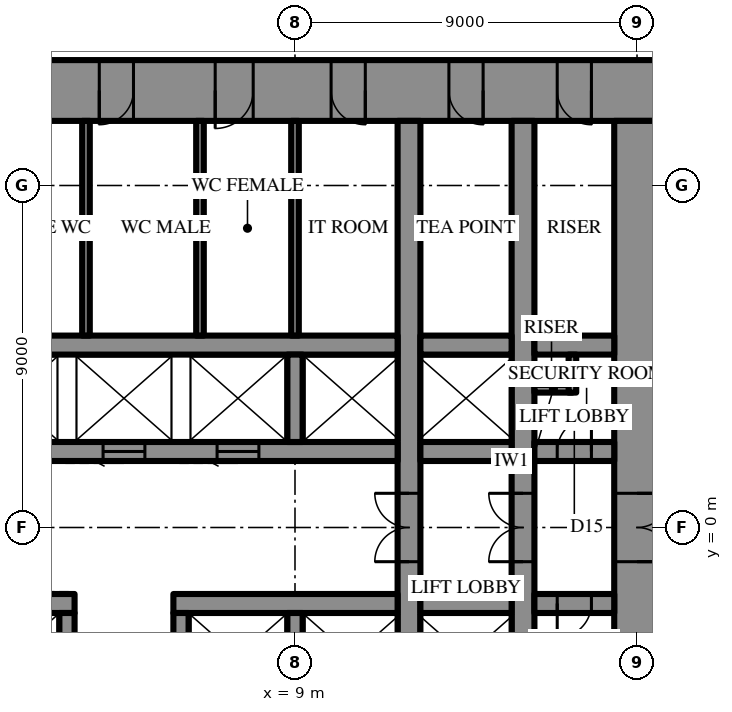
"""IFC4 building model, lengths in metres.
Left out: names, types, materials, properties, quantities, classifications, styles, units other than length and angle.
Written with IfcOpenShell. Run it as: python <this file> out.ifc"""

import sys

from ifc_helpers import new_model, si_unit, direction, frame, frame_2d, origin, place, context, subcontext, project, spatial, rectangle, extrude, element, fill, save


model = new_model("IFC4")
c1 = context("Model", 3, precision=1e-05, world=origin(), true_north=direction((0.0, 1.0)))
c2 = subcontext(c1, "Body", "Model", "MODEL_VIEW")
j1 = project(units=[si_unit("LENGTHUNIT", "METRE"), si_unit("PLANEANGLEUNIT", "RADIAN")], contexts=[c1])
p1 = place(None, origin())
s1 = spatial("IfcSite", under=j1, at=p1, CompositionType="ELEMENT")
p2 = place(p1, origin())
s2 = spatial("IfcBuilding", under=s1, at=p2, CompositionType="ELEMENT")
p3 = place(p2, frame((0.0, 0.0, 195.1)))
s3 = spatial("IfcBuildingStorey", under=s2, at=p3, CompositionType="ELEMENT", Elevation=195.1)
p4 = place(p3, frame((-18.6, 11.5, 0.0), z_axis=(0.0, 0.0, 1.0), x_axis=(1.0, 0.0, 0.0)))
e1 = element("IfcWall", 1, at=p4, inside=s3, PredefinedType="SHEAR", context=c2, shape_type="SweptSolid", body=[
    extrude(rectangle(XDim=37.2, YDim=1.6, at=frame_2d((18.6, 0.0))), origin(), (0.0, 0.0, 1.0), 4.2),
])
p5 = place(p4, frame((19.45, 0.0, 0.0)))
e2 = element("IfcOpeningElement", 2, at=p5, cuts=e1, PredefinedType="OPENING", context=c2, shape_type="SweptSolid", body=[
    extrude(rectangle(XDim=0.9, YDim=2.2, at=frame_2d((0.45, 1.1))), frame((0.0, 0.81, 0.0), z_axis=(0.0, -1.0, 0.0), x_axis=(1.0, 0.0, 0.0)), (0.0, 0.0, 1.0), 1.62),
])
p6 = place(p4, frame((22.45, 0.0, 0.0)))
e3 = element("IfcOpeningElement", 3, at=p6, cuts=e1, PredefinedType="OPENING", context=c2, shape_type="SweptSolid", body=[
    extrude(rectangle(XDim=0.9, YDim=2.2, at=frame_2d((0.45, 1.1))), frame((0.0, 0.81, 0.0), z_axis=(0.0, -1.0, 0.0), x_axis=(1.0, 0.0, 0.0)), (0.0, 0.0, 1.0), 1.62),
])
p7 = place(p4, frame((25.5, 0.0, 0.0)))
e4 = element("IfcOpeningElement", 4, at=p7, cuts=e1, PredefinedType="OPENING", context=c2, shape_type="SweptSolid", body=[
    extrude(rectangle(XDim=1.0, YDim=2.2, at=frame_2d((0.5, 1.1))), frame((0.0, 0.81, 0.0), z_axis=(0.0, -1.0, 0.0), x_axis=(1.0, 0.0, 0.0)), (0.0, 0.0, 1.0), 1.62),
])
p8 = place(p4, frame((1.8, 0.0, 0.0)))
e5 = element("IfcOpeningElement", 5, at=p8, cuts=e1, PredefinedType="OPENING", context=c2, shape_type="SweptSolid", body=[
    extrude(rectangle(XDim=0.9, YDim=2.2, at=frame_2d((0.45, 1.1))), frame((0.0, 0.81, 0.0), z_axis=(0.0, -1.0, 0.0), x_axis=(1.0, 0.0, 0.0)), (0.0, 0.0, 1.0), 1.62),
])
p9 = place(p4, frame((4.65, 0.0, 0.0)))
e6 = element("IfcOpeningElement", 6, at=p9, cuts=e1, PredefinedType="OPENING", context=c2, shape_type="SweptSolid", body=[
    extrude(rectangle(XDim=0.9, YDim=2.2, at=frame_2d((0.45, 1.1))), frame((0.0, 0.81, 0.0), z_axis=(0.0, -1.0, 0.0), x_axis=(1.0, 0.0, 0.0)), (0.0, 0.0, 1.0), 1.62),
])
p10 = place(p4, frame((7.75, 0.0, 0.0)))
e7 = element("IfcOpeningElement", 7, at=p10, cuts=e1, PredefinedType="OPENING", context=c2, shape_type="SweptSolid", body=[
    extrude(rectangle(XDim=0.9, YDim=2.2, at=frame_2d((0.45, 1.1))), frame((0.0, 0.81, 0.0), z_axis=(0.0, -1.0, 0.0), x_axis=(1.0, 0.0, 0.0)), (0.0, 0.0, 1.0), 1.62),
])
p11 = place(p4, frame((28.55, 0.0, 0.0)))
e8 = element("IfcOpeningElement", 8, at=p11, cuts=e1, PredefinedType="OPENING", context=c2, shape_type="SweptSolid", body=[
    extrude(rectangle(XDim=0.9, YDim=2.2, at=frame_2d((0.45, 1.1))), frame((0.0, 0.81, 0.0), z_axis=(0.0, -1.0, 0.0), x_axis=(1.0, 0.0, 0.0)), (0.0, 0.0, 1.0), 1.62),
])
p12 = place(p4, frame((31.65, 0.0, 0.0)))
e9 = element("IfcOpeningElement", 9, at=p12, cuts=e1, PredefinedType="OPENING", context=c2, shape_type="SweptSolid", body=[
    extrude(rectangle(XDim=0.9, YDim=2.2, at=frame_2d((0.45, 1.1))), frame((0.0, 0.81, 0.0), z_axis=(0.0, -1.0, 0.0), x_axis=(1.0, 0.0, 0.0)), (0.0, 0.0, 1.0), 1.62),
])
p13 = place(p4, frame((34.5, 0.0, 0.0)))
e10 = element("IfcOpeningElement", 10, at=p13, cuts=e1, PredefinedType="OPENING", context=c2, shape_type="SweptSolid", body=[
    extrude(rectangle(XDim=0.9, YDim=2.2, at=frame_2d((0.45, 1.1))), frame((0.0, 0.81, 0.0), z_axis=(0.0, -1.0, 0.0), x_axis=(1.0, 0.0, 0.0)), (0.0, 0.0, 1.0), 1.62),
])
p14 = place(p3, frame((18.0, -10.7, 0.0), z_axis=(0.0, 0.0, 1.0), x_axis=(0.0, 1.0, 0.0)))
e11 = element("IfcWall", 11, at=p14, inside=s3, PredefinedType="SHEAR", context=c2, shape_type="SweptSolid", body=[
    extrude(rectangle(XDim=21.4, YDim=1.2, at=frame_2d((10.7, 0.0))), origin(), (0.0, 0.0, 1.0), 4.2),
])
p15 = place(p14, frame((9.8, 0.0, 0.0)))
e12 = element("IfcOpeningElement", 12, at=p15, cuts=e11, PredefinedType="OPENING", context=c2, shape_type="SweptSolid", body=[
    extrude(rectangle(XDim=1.8, YDim=2.4, at=frame_2d((0.9, 1.2))), frame((0.0, 0.61, 0.0), z_axis=(0.0, -1.0, 0.0), x_axis=(1.0, 0.0, 0.0)), (0.0, 0.0, 1.0), 1.22),
])
p16 = place(p3, frame((12.0, -10.7, 0.0), z_axis=(0.0, 0.0, 1.0), x_axis=(0.0, 1.0, 0.0)))
e13 = element("IfcWall", 13, at=p16, inside=s3, PredefinedType="SHEAR", context=c2, shape_type="SweptSolid", body=[
    extrude(rectangle(XDim=21.4, YDim=0.6, at=frame_2d((10.7, 0.0))), origin(), (0.0, 0.0, 1.0), 4.2),
])
p17 = place(p16, frame((9.8, 0.0, 0.0)))
e14 = element("IfcOpeningElement", 14, at=p17, cuts=e13, PredefinedType="OPENING", context=c2, shape_type="SweptSolid", body=[
    extrude(rectangle(XDim=1.8, YDim=2.4, at=frame_2d((0.9, 1.2))), frame((0.0, 0.31, 0.0), z_axis=(0.0, -1.0, 0.0), x_axis=(1.0, 0.0, 0.0)), (0.0, 0.0, 1.0), 0.62),
])
p18 = place(p3, frame((15.0, -10.7, 0.0), z_axis=(0.0, 0.0, 1.0), x_axis=(0.0, 1.0, 0.0)))
e15 = element("IfcWall", 15, at=p18, inside=s3, PredefinedType="SHEAR", context=c2, shape_type="SweptSolid", body=[
    extrude(rectangle(XDim=21.4, YDim=0.6, at=frame_2d((10.7, 0.0))), origin(), (0.0, 0.0, 1.0), 4.2),
])
p19 = place(p18, frame((9.8, 0.0, 0.0)))
e16 = element("IfcOpeningElement", 16, at=p19, cuts=e15, PredefinedType="OPENING", context=c2, shape_type="SweptSolid", body=[
    extrude(rectangle(XDim=1.8, YDim=2.4, at=frame_2d((0.9, 1.2))), frame((0.0, 0.31, 0.0), z_axis=(0.0, -1.0, 0.0), x_axis=(1.0, 0.0, 0.0)), (0.0, 0.0, 1.0), 0.62),
])
p20 = place(p3, frame((-3.2, 2.0, 0.0), z_axis=(0.0, 0.0, 1.0), x_axis=(1.0, 0.0, 0.0)))
e17 = element("IfcWall", 17, at=p20, inside=s3, PredefinedType="SHEAR", context=c2, shape_type="SweptSolid", body=[
    extrude(rectangle(XDim=14.9, YDim=0.5, at=frame_2d((7.45, 0.0))), origin(), (0.0, 0.0, 1.0), 4.2),
])
p21 = place(p20, frame((1.15, 0.0, 0.0)))
e18 = element("IfcOpeningElement", 18, at=p21, cuts=e17, PredefinedType="OPENING", context=c2, shape_type="SweptSolid", body=[
    extrude(rectangle(XDim=1.1, YDim=2.2, at=frame_2d((0.55, 1.1))), frame((0.0, 0.26, 0.0), z_axis=(0.0, -1.0, 0.0), x_axis=(1.0, 0.0, 0.0)), (0.0, 0.0, 1.0), 0.52),
])
p22 = place(p20, frame((4.15, 0.0, 0.0)))
e19 = element("IfcOpeningElement", 19, at=p22, cuts=e17, PredefinedType="OPENING", context=c2, shape_type="SweptSolid", body=[
    extrude(rectangle(XDim=1.1, YDim=2.2, at=frame_2d((0.55, 1.1))), frame((0.0, 0.26, 0.0), z_axis=(0.0, -1.0, 0.0), x_axis=(1.0, 0.0, 0.0)), (0.0, 0.0, 1.0), 0.52),
])
p23 = place(p20, frame((7.15, 0.0, 0.0)))
e20 = element("IfcOpeningElement", 20, at=p23, cuts=e17, PredefinedType="OPENING", context=c2, shape_type="SweptSolid", body=[
    extrude(rectangle(XDim=1.1, YDim=2.2, at=frame_2d((0.55, 1.1))), frame((0.0, 0.26, 0.0), z_axis=(0.0, -1.0, 0.0), x_axis=(1.0, 0.0, 0.0)), (0.0, 0.0, 1.0), 0.52),
])
p24 = place(p20, frame((10.15, 0.0, 0.0)))
e21 = element("IfcOpeningElement", 21, at=p24, cuts=e17, PredefinedType="OPENING", context=c2, shape_type="SweptSolid", body=[
    extrude(rectangle(XDim=1.1, YDim=2.2, at=frame_2d((0.55, 1.1))), frame((0.0, 0.26, 0.0), z_axis=(0.0, -1.0, 0.0), x_axis=(1.0, 0.0, 0.0)), (0.0, 0.0, 1.0), 0.52),
])
p25 = place(p3, frame((12.3, 2.0, 0.0), z_axis=(0.0, 0.0, 1.0), x_axis=(1.0, 0.0, 0.0)))
e22 = element("IfcWall", 22, at=p25, inside=s3, PredefinedType="SHEAR", context=c2, shape_type="SweptSolid", body=[
    extrude(rectangle(XDim=2.4, YDim=0.5, at=frame_2d((1.2, 0.0))), origin(), (0.0, 0.0, 1.0), 4.2),
])
p26 = place(p3, frame((15.3, 2.0, 0.0), z_axis=(0.0, 0.0, 1.0), x_axis=(1.0, 0.0, 0.0)))
e23 = element("IfcWall", 23, at=p26, inside=s3, PredefinedType="SHEAR", context=c2, shape_type="SweptSolid", body=[
    extrude(rectangle(XDim=2.1, YDim=0.5, at=frame_2d((1.05, 0.0))), origin(), (0.0, 0.0, 1.0), 4.2),
])
p27 = place(p26, frame((0.6, 0.0, 0.0)))
e24 = element("IfcOpeningElement", 24, at=p27, cuts=e23, PredefinedType="OPENING", context=c2, shape_type="SweptSolid", body=[
    extrude(rectangle(XDim=0.9, YDim=2.2, at=frame_2d((0.45, 1.1))), frame((0.0, 0.26, 0.0), z_axis=(0.0, -1.0, 0.0), x_axis=(1.0, 0.0, 0.0)), (0.0, 0.0, 1.0), 0.52),
])
p28 = place(p3, frame((-11.7, 4.8, 0.0), z_axis=(0.0, 0.0, 1.0), x_axis=(1.0, 0.0, 0.0)))
e25 = element("IfcWall", 25, at=p28, inside=s3, PredefinedType="SHEAR", context=c2, shape_type="SweptSolid", body=[
    extrude(rectangle(XDim=23.4, YDim=0.5, at=frame_2d((11.7, 0.0))), origin(), (0.0, 0.0, 1.0), 4.2),
])
p29 = place(p28, frame((6.6, 0.0, 0.0)))
e26 = element("IfcOpeningElement", 26, at=p29, cuts=e25, PredefinedType="OPENING", context=c2, shape_type="SweptSolid", body=[
    extrude(rectangle(XDim=1.2, YDim=2.2, at=frame_2d((0.6, 1.1))), frame((0.0, 0.26, 0.0), z_axis=(0.0, -1.0, 0.0), x_axis=(1.0, 0.0, 0.0)), (0.0, 0.0, 1.0), 0.52),
])
p30 = place(p28, frame((3.6, 0.0, 0.0)))
e27 = element("IfcOpeningElement", 27, at=p30, cuts=e25, PredefinedType="OPENING", context=c2, shape_type="SweptSolid", body=[
    extrude(rectangle(XDim=1.2, YDim=2.2, at=frame_2d((0.6, 1.1))), frame((0.0, 0.26, 0.0), z_axis=(0.0, -1.0, 0.0), x_axis=(1.0, 0.0, 0.0)), (0.0, 0.0, 1.0), 0.52),
])
p31 = place(p3, frame((12.3, 4.8, 0.0), z_axis=(0.0, 0.0, 1.0), x_axis=(1.0, 0.0, 0.0)))
e28 = element("IfcWall", 28, at=p31, inside=s3, PredefinedType="SHEAR", context=c2, shape_type="SweptSolid", body=[
    extrude(rectangle(XDim=2.4, YDim=0.5, at=frame_2d((1.2, 0.0))), origin(), (0.0, 0.0, 1.0), 4.2),
])
p32 = place(p3, frame((15.3, 4.8, 0.0), z_axis=(0.0, 0.0, 1.0), x_axis=(1.0, 0.0, 0.0)))
e29 = element("IfcWall", 29, at=p32, inside=s3, PredefinedType="SHEAR", context=c2, shape_type="SweptSolid", body=[
    extrude(rectangle(XDim=2.1, YDim=0.5, at=frame_2d((1.05, 0.0))), origin(), (0.0, 0.0, 1.0), 4.2),
])
p33 = place(p3, frame((9.0, 2.25, 0.0), z_axis=(0.0, 0.0, 1.0), x_axis=(0.0, 1.0, 0.0)))
e30 = element("IfcWall", 30, at=p33, inside=s3, PredefinedType="SHEAR", context=c2, shape_type="SweptSolid", body=[
    extrude(rectangle(XDim=2.3, YDim=0.4, at=frame_2d((1.15, 0.0))), origin(), (0.0, 0.0, 1.0), 4.2),
])
p34 = place(p3, frame((17.4, -2.0, 0.0), z_axis=(0.0, 0.0, 1.0), x_axis=(-1.0, 0.0, 0.0)))
e31 = element("IfcWall", 31, at=p34, inside=s3, PredefinedType="SHEAR", context=c2, shape_type="SweptSolid", body=[
    extrude(rectangle(XDim=2.1, YDim=0.5, at=frame_2d((1.05, 0.0))), origin(), (0.0, 0.0, 1.0), 4.2),
])
p35 = place(p34, frame((0.6, 0.0, 0.0)))
e32 = element("IfcOpeningElement", 32, at=p35, cuts=e31, PredefinedType="OPENING", context=c2, shape_type="SweptSolid", body=[
    extrude(rectangle(XDim=0.9, YDim=2.2, at=frame_2d((0.45, 1.1))), frame((0.0, 0.26, 0.0), z_axis=(0.0, -1.0, 0.0), x_axis=(1.0, 0.0, 0.0)), (0.0, 0.0, 1.0), 0.52),
])
p36 = place(p3, frame((14.7, -2.0, 0.0), z_axis=(0.0, 0.0, 1.0), x_axis=(-1.0, 0.0, 0.0)))
e33 = element("IfcWall", 33, at=p36, inside=s3, PredefinedType="SHEAR", context=c2, shape_type="SweptSolid", body=[
    extrude(rectangle(XDim=2.4, YDim=0.5, at=frame_2d((1.2, 0.0))), origin(), (0.0, 0.0, 1.0), 4.2),
])
p37 = place(p3, frame((11.7, -2.0, 0.0), z_axis=(0.0, 0.0, 1.0), x_axis=(-1.0, 0.0, 0.0)))
e34 = element("IfcWall", 34, at=p37, inside=s3, PredefinedType="SHEAR", context=c2, shape_type="SweptSolid", body=[
    extrude(rectangle(XDim=5.9, YDim=0.5, at=frame_2d((2.95, 0.0))), origin(), (0.0, 0.0, 1.0), 4.2),
])
p38 = place(p3, frame((3.2, -2.0, 0.0), z_axis=(0.0, 0.0, 1.0), x_axis=(-1.0, 0.0, 0.0)))
e35 = element("IfcWall", 35, at=p38, inside=s3, PredefinedType="SHEAR", context=c2, shape_type="SweptSolid", body=[
    extrude(rectangle(XDim=14.9, YDim=0.5, at=frame_2d((7.45, 0.0))), origin(), (0.0, 0.0, 1.0), 4.2),
])
p39 = place(p38, frame((1.15, 0.0, 0.0)))
e36 = element("IfcOpeningElement", 36, at=p39, cuts=e35, PredefinedType="OPENING", context=c2, shape_type="SweptSolid", body=[
    extrude(rectangle(XDim=1.1, YDim=2.2, at=frame_2d((0.55, 1.1))), frame((0.0, 0.26, 0.0), z_axis=(0.0, -1.0, 0.0), x_axis=(1.0, 0.0, 0.0)), (0.0, 0.0, 1.0), 0.52),
])
p40 = place(p38, frame((4.15, 0.0, 0.0)))
e37 = element("IfcOpeningElement", 37, at=p40, cuts=e35, PredefinedType="OPENING", context=c2, shape_type="SweptSolid", body=[
    extrude(rectangle(XDim=1.1, YDim=2.2, at=frame_2d((0.55, 1.1))), frame((0.0, 0.26, 0.0), z_axis=(0.0, -1.0, 0.0), x_axis=(1.0, 0.0, 0.0)), (0.0, 0.0, 1.0), 0.52),
])
p41 = place(p38, frame((7.15, 0.0, 0.0)))
e38 = element("IfcOpeningElement", 38, at=p41, cuts=e35, PredefinedType="OPENING", context=c2, shape_type="SweptSolid", body=[
    extrude(rectangle(XDim=1.1, YDim=2.2, at=frame_2d((0.55, 1.1))), frame((0.0, 0.26, 0.0), z_axis=(0.0, -1.0, 0.0), x_axis=(1.0, 0.0, 0.0)), (0.0, 0.0, 1.0), 0.52),
])
p42 = place(p38, frame((10.15, 0.0, 0.0)))
e39 = element("IfcOpeningElement", 39, at=p42, cuts=e35, PredefinedType="OPENING", context=c2, shape_type="SweptSolid", body=[
    extrude(rectangle(XDim=1.1, YDim=2.2, at=frame_2d((0.55, 1.1))), frame((0.0, 0.26, 0.0), z_axis=(0.0, -1.0, 0.0), x_axis=(1.0, 0.0, 0.0)), (0.0, 0.0, 1.0), 0.52),
])
for number, where, z_axis, x_axis in (
    (40, (9.0, -2.25, 0.0), (0.0, 0.0, 1.0), (0.0, -1.0, 0.0)),
    (41, (6.0, -2.25, 0.0), (0.0, 0.0, 1.0), (0.0, -1.0, 0.0)),
    (42, (3.0, -2.25, 0.0), (0.0, 0.0, 1.0), (0.0, -1.0, 0.0)),
):
    element("IfcWall", number, at=place(p3, frame(where, z_axis=z_axis, x_axis=x_axis)), inside=s3, PredefinedType="SHEAR", context=c2, shape_type="SweptSolid", body=[
        extrude(rectangle(XDim=2.3, YDim=0.4, at=frame_2d((1.15, 0.0))), origin(), (0.0, 0.0, 1.0), 4.2),
    ])
for number, where, z_axis, x_axis in (
    (43, (9.0, 5.05, 0.0), (0.0, 0.0, 1.0), (0.0, 1.0, 0.0)),
    (44, (3.5, 5.05, 0.0), (0.0, 0.0, 1.0), (0.0, 1.0, 0.0)),
    (45, (6.5, 5.05, 0.0), (0.0, 0.0, 1.0), (0.0, 1.0, 0.0)),
):
    element("IfcWall", number, at=place(p3, frame(where, z_axis=z_axis, x_axis=x_axis)), inside=s3, PredefinedType="PARTITIONING", context=c2, shape_type="SweptSolid", body=[
        extrude(rectangle(XDim=5.65, YDim=0.2, at=frame_2d((2.825, 0.0))), origin(), (0.0, 0.0, 1.0), 4.0),
    ])
for number, where, z_axis, x_axis in (
    (46, (15.3, 3.65, 0.0), (0.0, 0.0, 1.0), (1.0, 0.0, 0.0)),
    (47, (16.3, 3.55, 0.0), (0.0, 0.0, 1.0), (0.0, 1.0, 0.0)),
):
    element("IfcWall", number, at=place(p3, frame(where, z_axis=z_axis, x_axis=x_axis)), inside=s3, PredefinedType="PARTITIONING", context=c2, shape_type="SweptSolid", body=[
        extrude(rectangle(XDim=1.0, YDim=0.2, at=frame_2d((0.5, 0.0))), origin(), (0.0, 0.0, 1.0), 4.0),
    ])
p43 = place(p3, frame((28.436, 4.747, 0.0), z_axis=(0.0, 0.0, 1.0), x_axis=(-0.499995666571, 0.866027905677, 0.0)))
e48 = element("IfcWall", 48, at=p43, inside=s3, PredefinedType="PARTITIONING", context=c2, shape_type="SweptSolid", body=[
    extrude(rectangle(XDim=20.215, YDim=0.2, at=frame_2d((10.107, 0.0))), origin(), (0.0, 0.0, 1.0), 4.0),
])
p44 = place(p43, frame((2.102, 0.0, 0.0)))
e49 = element("IfcOpeningElement", 49, at=p44, cuts=e48, PredefinedType="OPENING", context=c2, shape_type="SweptSolid", body=[
    extrude(rectangle(XDim=1.0, YDim=2.2, at=frame_2d((0.5, 1.1))), frame((0.0, 0.11, 0.0), z_axis=(0.0, -1.0, 0.0), x_axis=(1.0, 0.0, 0.0)), (0.0, 0.0, 1.0), 0.22),
])
p45 = place(p43, frame((7.105, 0.0, 0.0)))
e50 = element("IfcOpeningElement", 50, at=p45, cuts=e48, PredefinedType="OPENING", context=c2, shape_type="SweptSolid", body=[
    extrude(rectangle(XDim=1.0, YDim=2.2, at=frame_2d((0.5, 1.1))), frame((0.0, 0.11, 0.0), z_axis=(0.0, -1.0, 0.0), x_axis=(1.0, 0.0, 0.0)), (0.0, 0.0, 1.0), 0.22),
])
p46 = place(p43, frame((12.109, 0.0, 0.0)))
e51 = element("IfcOpeningElement", 51, at=p46, cuts=e48, PredefinedType="OPENING", context=c2, shape_type="SweptSolid", body=[
    extrude(rectangle(XDim=1.0, YDim=2.2, at=frame_2d((0.5, 1.1))), frame((0.0, 0.11, 0.0), z_axis=(0.0, -1.0, 0.0), x_axis=(1.0, 0.0, 0.0)), (0.0, 0.0, 1.0), 0.22),
])
p47 = place(p43, frame((17.113, 0.0, 0.0)))
e52 = element("IfcOpeningElement", 52, at=p47, cuts=e48, PredefinedType="OPENING", context=c2, shape_type="SweptSolid", body=[
    extrude(rectangle(XDim=1.0, YDim=2.2, at=frame_2d((0.5, 1.1))), frame((0.0, 0.11, 0.0), z_axis=(0.0, -1.0, 0.0), x_axis=(1.0, 0.0, 0.0)), (0.0, 0.0, 1.0), 0.22),
])
p48 = place(p15, frame((1.8, 0.0, 0.0), z_axis=(0.0, 0.0, 1.0), x_axis=(-1.0, 0.0, 0.0)))
e53 = element("IfcDoor", 53, at=p48, inside=s3, OperationType="DOUBLE_DOOR_SINGLE_SWING", PredefinedType="DOOR", context=c2, shape_type="SweptSolid", body=[
    extrude(rectangle(XDim=1.8, YDim=2.4, at=frame_2d((0.9, 1.2))), frame((0.0, 0.025, 0.0), z_axis=(0.0, -1.0, 0.0), x_axis=(1.0, 0.0, 0.0)), (0.0, 0.0, 1.0), 0.05),
])
fill(e12, e53)
p49 = place(p6, frame((0.9, 0.0, 0.0), z_axis=(0.0, 0.0, 1.0), x_axis=(-1.0, 0.0, 0.0)))
e54 = element("IfcDoor", 54, at=p49, inside=s3, OperationType="SINGLE_SWING_LEFT", PredefinedType="DOOR", context=c2, shape_type="SweptSolid", body=[
    extrude(rectangle(XDim=0.9, YDim=2.2, at=frame_2d((0.45, 1.1))), frame((0.0, 0.025, 0.0), z_axis=(0.0, -1.0, 0.0), x_axis=(1.0, 0.0, 0.0)), (0.0, 0.0, 1.0), 0.05),
])
fill(e3, e54)
p50 = place(p7, frame((1.0, 0.0, 0.0), z_axis=(0.0, 0.0, 1.0), x_axis=(-1.0, 0.0, 0.0)))
e55 = element("IfcDoor", 55, at=p50, inside=s3, OperationType="SINGLE_SWING_LEFT", PredefinedType="DOOR", context=c2, shape_type="SweptSolid", body=[
    extrude(rectangle(XDim=1.0, YDim=2.2, at=frame_2d((0.5, 1.1))), frame((0.0, 0.025, 0.0), z_axis=(0.0, -1.0, 0.0), x_axis=(1.0, 0.0, 0.0)), (0.0, 0.0, 1.0), 0.05),
])
fill(e4, e55)
p51 = place(p11, frame((0.9, 0.0, 0.0), z_axis=(0.0, 0.0, 1.0), x_axis=(-1.0, 0.0, 0.0)))
e56 = element("IfcDoor", 56, at=p51, inside=s3, OperationType="SINGLE_SWING_RIGHT", PredefinedType="DOOR", context=c2, shape_type="SweptSolid", body=[
    extrude(rectangle(XDim=0.9, YDim=2.2, at=frame_2d((0.45, 1.1))), frame((0.0, 0.025, 0.0), z_axis=(0.0, -1.0, 0.0), x_axis=(1.0, 0.0, 0.0)), (0.0, 0.0, 1.0), 0.05),
])
fill(e8, e56)
p52 = place(p12, frame((0.9, 0.0, 0.0), z_axis=(0.0, 0.0, 1.0), x_axis=(-1.0, 0.0, 0.0)))
e57 = element("IfcDoor", 57, at=p52, inside=s3, OperationType="SINGLE_SWING_RIGHT", PredefinedType="DOOR", context=c2, shape_type="SweptSolid", body=[
    extrude(rectangle(XDim=0.9, YDim=2.2, at=frame_2d((0.45, 1.1))), frame((0.0, 0.025, 0.0), z_axis=(0.0, -1.0, 0.0), x_axis=(1.0, 0.0, 0.0)), (0.0, 0.0, 1.0), 0.05),
])
fill(e9, e57)
p53 = place(p13, frame((0.9, 0.0, 0.0), z_axis=(0.0, 0.0, 1.0), x_axis=(-1.0, 0.0, 0.0)))
e58 = element("IfcDoor", 58, at=p53, inside=s3, OperationType="SINGLE_SWING_RIGHT", PredefinedType="DOOR", context=c2, shape_type="SweptSolid", body=[
    extrude(rectangle(XDim=0.9, YDim=2.2, at=frame_2d((0.45, 1.1))), frame((0.0, 0.025, 0.0), z_axis=(0.0, -1.0, 0.0), x_axis=(1.0, 0.0, 0.0)), (0.0, 0.0, 1.0), 0.05),
])
fill(e10, e58)
p54 = place(p27, origin())
e59 = element("IfcDoor", 59, at=p54, inside=s3, OperationType="SINGLE_SWING_LEFT", PredefinedType="DOOR", context=c2, shape_type="SweptSolid", body=[
    extrude(rectangle(XDim=0.9, YDim=2.2, at=frame_2d((0.45, 1.1))), frame((0.0, 0.025, 0.0), z_axis=(0.0, -1.0, 0.0), x_axis=(1.0, 0.0, 0.0)), (0.0, 0.0, 1.0), 0.05),
])
fill(e24, e59)
p55 = place(p35, origin())
e60 = element("IfcDoor", 60, at=p55, inside=s3, OperationType="SINGLE_SWING_LEFT", PredefinedType="DOOR", context=c2, shape_type="SweptSolid", body=[
    extrude(rectangle(XDim=0.9, YDim=2.2, at=frame_2d((0.45, 1.1))), frame((0.0, 0.025, 0.0), z_axis=(0.0, -1.0, 0.0), x_axis=(1.0, 0.0, 0.0)), (0.0, 0.0, 1.0), 0.05),
])
fill(e32, e60)
p56 = place(p17, origin())
e61 = element("IfcDoor", 61, at=p56, inside=s3, OperationType="DOUBLE_DOOR_SINGLE_SWING", PredefinedType="DOOR", context=c2, shape_type="SweptSolid", body=[
    extrude(rectangle(XDim=1.8, YDim=2.4, at=frame_2d((0.9, 1.2))), frame((0.0, 0.025, 0.0), z_axis=(0.0, -1.0, 0.0), x_axis=(1.0, 0.0, 0.0)), (0.0, 0.0, 1.0), 0.05),
])
fill(e14, e61)
p57 = place(p19, origin())
e62 = element("IfcDoor", 62, at=p57, inside=s3, OperationType="DOUBLE_DOOR_SINGLE_SWING", PredefinedType="DOOR", context=c2, shape_type="SweptSolid", body=[
    extrude(rectangle(XDim=1.8, YDim=2.4, at=frame_2d((0.9, 1.2))), frame((0.0, 0.025, 0.0), z_axis=(0.0, -1.0, 0.0), x_axis=(1.0, 0.0, 0.0)), (0.0, 0.0, 1.0), 0.05),
])
fill(e16, e62)
p58 = place(p23, frame((1.1, 0.0, 0.0), z_axis=(0.0, 0.0, 1.0), x_axis=(-1.0, 0.0, 0.0)))
e63 = element("IfcDoor", 63, at=p58, inside=s3, OperationType="SLIDING_TO_LEFT", PredefinedType="DOOR", context=c2, shape_type="SweptSolid", body=[
    extrude(rectangle(XDim=1.1, YDim=2.2, at=frame_2d((0.55, 1.1))), frame((0.0, 0.025, 0.0), z_axis=(0.0, -1.0, 0.0), x_axis=(1.0, 0.0, 0.0)), (0.0, 0.0, 1.0), 0.05),
])
fill(e20, e63)
p59 = place(p24, frame((1.1, 0.0, 0.0), z_axis=(0.0, 0.0, 1.0), x_axis=(-1.0, 0.0, 0.0)))
e64 = element("IfcDoor", 64, at=p59, inside=s3, OperationType="SLIDING_TO_LEFT", PredefinedType="DOOR", context=c2, shape_type="SweptSolid", body=[
    extrude(rectangle(XDim=1.1, YDim=2.2, at=frame_2d((0.55, 1.1))), frame((0.0, 0.025, 0.0), z_axis=(0.0, -1.0, 0.0), x_axis=(1.0, 0.0, 0.0)), (0.0, 0.0, 1.0), 0.05),
])
fill(e21, e64)
save(model, sys.argv[1])
